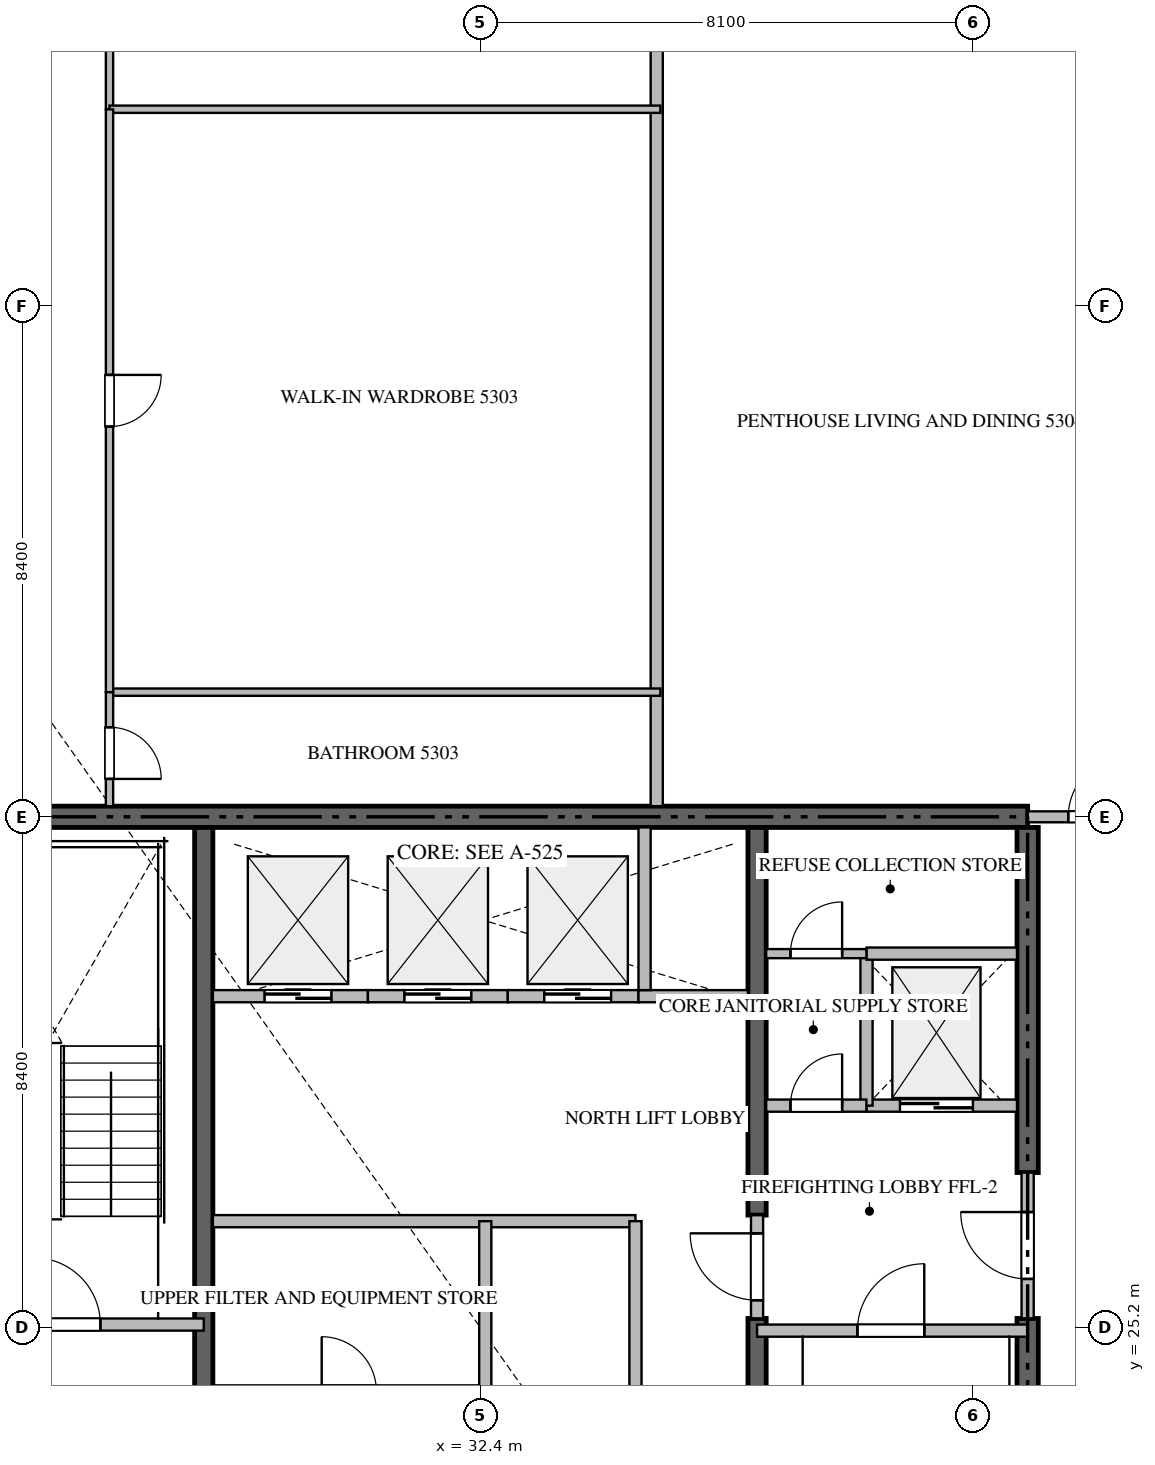
"""IFC4 building model, lengths in metres.
Left out: names, types, materials, properties, quantities, classifications, styles, units other than length and angle.
Written with IfcOpenShell. Run it as: python <this file> out.ifc"""

import sys

from ifc_helpers import new_model, si_unit, direction, frame, frame_2d, origin, place, context, subcontext, project, spatial, rectangle, extrude, source, transform, mapped, element, fill, save


model = new_model("IFC4")
c1 = context("Model", 3, precision=1e-05, world=origin(), true_north=direction((0.0, 1.0)))
c2 = subcontext(c1, "Body", "Model", "MODEL_VIEW")
j1 = project(units=[si_unit("LENGTHUNIT", "METRE"), si_unit("PLANEANGLEUNIT", "RADIAN")], contexts=[c1])
p1 = place(None, origin())
s1 = spatial("IfcSite", under=j1, at=p1, CompositionType="ELEMENT")
p2 = place(p1, origin())
s2 = spatial("IfcBuilding", under=s1, at=p2, CompositionType="ELEMENT")
p3 = place(p2, frame((0.0, 0.0, 214.3)))
s3 = spatial("IfcBuildingStorey", under=s2, at=p3, CompositionType="ELEMENT", Elevation=214.3)
p4 = place(p3, frame((41.4, 33.6, -0.26), z_axis=(0.0, 0.0, 1.0), x_axis=(-1.0, 0.0, 0.0)))
e1 = element("IfcWall", 1, at=p4, inside=s3, PredefinedType="SHEAR", context=c2, shape_type="SweptSolid", body=[
    extrude(rectangle(XDim=18.0, YDim=0.35, at=frame_2d((9.0, 0.0))), origin(), (0.0, 0.0, 1.0), 3.848),
])
p5 = place(p3, frame((41.4, 16.975, -0.26), z_axis=(0.0, 0.0, 1.0), x_axis=(0.0, 1.0, 0.0)))
e2 = element("IfcWall", 2, at=p5, inside=s3, PredefinedType="SHEAR", context=c2, shape_type="SweptSolid", body=[
    extrude(rectangle(XDim=8.375, YDim=0.35, at=frame_2d((4.188, 0.0))), origin(), (0.0, 0.0, 1.0), 3.848),
])
p6 = place(p3, frame((41.4, 27.75, -0.26), z_axis=(0.0, 0.0, 1.0), x_axis=(0.0, 1.0, 0.0)))
e3 = element("IfcWall", 3, at=p6, inside=s3, PredefinedType="SHEAR", context=c2, shape_type="SweptSolid", body=[
    extrude(rectangle(XDim=5.675, YDim=0.35, at=frame_2d((2.837, 0.0))), origin(), (0.0, 0.0, 1.0), 3.848),
])
p7 = place(p3, frame((27.85, 23.55, -0.26), z_axis=(0.0, 0.0, 1.0), x_axis=(0.0, 1.0, 0.0)))
e4 = element("IfcWall", 4, at=p7, inside=s3, PredefinedType="SHEAR", context=c2, shape_type="SweptSolid", body=[
    extrude(rectangle(XDim=9.875, YDim=0.3, at=frame_2d((4.938, 0.0))), origin(), (0.0, 0.0, 1.0), 3.848),
])
p8 = place(p3, frame((36.95, 16.975, -0.26), z_axis=(0.0, 0.0, 1.0), x_axis=(0.0, 1.0, 0.0)))
e5 = element("IfcWall", 5, at=p8, inside=s3, PredefinedType="SHEAR", context=c2, shape_type="SweptSolid", body=[
    extrude(rectangle(XDim=8.375, YDim=0.3, at=frame_2d((4.188, 0.0))), origin(), (0.0, 0.0, 1.0), 3.848),
])
p9 = place(p3, frame((36.95, 27.05, -0.26), z_axis=(0.0, 0.0, 1.0), x_axis=(0.0, 1.0, 0.0)))
e6 = element("IfcWall", 6, at=p9, inside=s3, PredefinedType="SHEAR", context=c2, shape_type="SweptSolid", body=[
    extrude(rectangle(XDim=6.375, YDim=0.3, at=frame_2d((3.188, 0.0))), origin(), (0.0, 0.0, 1.0), 3.848),
])
p10 = place(p3, frame((23.4, 25.25, 0.0), z_axis=(0.0, 0.0, 1.0), x_axis=(1.0, 0.0, 0.0)))
e7 = element("IfcWall", 7, at=p10, inside=s3, PredefinedType="STANDARD", context=c2, shape_type="SweptSolid", body=[
    extrude(rectangle(XDim=4.45, YDim=0.2, at=frame_2d((2.225, 0.0))), origin(), (0.0, 0.0, 1.0), 3.59),
])
p11 = place(p10, frame((1.65, 0.0, 0.0)))
e8 = element("IfcOpeningElement", 8, at=p11, cuts=e7, PredefinedType="OPENING", context=c2, shape_type="SweptSolid", body=[
    extrude(rectangle(XDim=1.1, YDim=2.15, at=frame_2d((0.55, 1.075))), frame((0.0, 0.11, 0.0), z_axis=(0.0, -1.0, 0.0), x_axis=(1.0, 0.0, 0.0)), (0.0, 0.0, 1.0), 0.22),
])
p12 = place(p3, frame((36.95, 25.15, 0.0), z_axis=(0.0, 0.0, 1.0), x_axis=(1.0, 0.0, 0.0)))
e9 = element("IfcWall", 9, at=p12, inside=s3, PredefinedType="STANDARD", context=c2, shape_type="SweptSolid", body=[
    extrude(rectangle(XDim=4.45, YDim=0.2, at=frame_2d((2.225, 0.0))), origin(), (0.0, 0.0, 1.0), 3.59),
])
p13 = place(p12, frame((1.65, 0.0, 0.0)))
e10 = element("IfcOpeningElement", 10, at=p13, cuts=e9, PredefinedType="OPENING", context=c2, shape_type="SweptSolid", body=[
    extrude(rectangle(XDim=1.1, YDim=2.15, at=frame_2d((0.55, 1.075))), frame((0.0, 0.11, 0.0), z_axis=(0.0, -1.0, 0.0), x_axis=(1.0, 0.0, 0.0)), (0.0, 0.0, 1.0), 0.22),
])
p14 = place(p3, frame((38.75, 28.85, 0.0), z_axis=(0.0, 0.0, 1.0), x_axis=(1.0, 0.0, 0.0)))
e11 = element("IfcWall", 11, at=p14, inside=s3, PredefinedType="STANDARD", context=c2, shape_type="SweptSolid", body=[
    extrude(rectangle(XDim=2.475, YDim=0.2, at=frame_2d((1.238, 0.0))), origin(), (0.0, 0.0, 1.0), 3.59),
])
p15 = place(p14, frame((0.55, 0.0, 0.0)))
e12 = element("IfcOpeningElement", 12, at=p15, cuts=e11, PredefinedType="OPENING", context=c2, shape_type="SweptSolid", body=[
    extrude(rectangle(XDim=1.2, YDim=2.2, at=frame_2d((0.6, 1.1))), frame((0.0, 0.11, 0.0), z_axis=(0.0, -1.0, 0.0), x_axis=(1.0, 0.0, 0.0)), (0.0, 0.0, 1.0), 0.22),
])
p16 = place(p3, frame((28.0, 30.65, 0.0), z_axis=(0.0, 0.0, 1.0), x_axis=(1.0, 0.0, 0.0)))
e13 = element("IfcWall", 13, at=p16, inside=s3, PredefinedType="STANDARD", context=c2, shape_type="SweptSolid", body=[
    extrude(rectangle(XDim=2.55, YDim=0.2, at=frame_2d((1.275, 0.0))), origin(), (0.0, 0.0, 1.0), 3.59),
])
p17 = place(p16, frame((0.85, 0.0, 0.0)))
e14 = element("IfcOpeningElement", 14, at=p17, cuts=e13, PredefinedType="OPENING", context=c2, shape_type="SweptSolid", body=[
    extrude(rectangle(XDim=1.1, YDim=2.2, at=frame_2d((0.55, 1.1))), frame((0.0, 0.11, 0.0), z_axis=(0.0, -1.0, 0.0), x_axis=(1.0, 0.0, 0.0)), (0.0, 0.0, 1.0), 0.22),
])
p18 = place(p3, frame((30.55, 30.65, 0.0), z_axis=(0.0, 0.0, 1.0), x_axis=(1.0, 0.0, 0.0)))
e15 = element("IfcWall", 15, at=p18, inside=s3, PredefinedType="STANDARD", context=c2, shape_type="SweptSolid", body=[
    extrude(rectangle(XDim=2.3, YDim=0.2, at=frame_2d((1.15, 0.0))), origin(), (0.0, 0.0, 1.0), 3.59),
])
p19 = place(p18, frame((0.6, 0.0, 0.0)))
e16 = element("IfcOpeningElement", 16, at=p19, cuts=e15, PredefinedType="OPENING", context=c2, shape_type="SweptSolid", body=[
    extrude(rectangle(XDim=1.1, YDim=2.2, at=frame_2d((0.55, 1.1))), frame((0.0, 0.11, 0.0), z_axis=(0.0, -1.0, 0.0), x_axis=(1.0, 0.0, 0.0)), (0.0, 0.0, 1.0), 0.22),
])
p20 = place(p3, frame((32.85, 30.65, 0.0), z_axis=(0.0, 0.0, 1.0), x_axis=(1.0, 0.0, 0.0)))
e17 = element("IfcWall", 17, at=p20, inside=s3, PredefinedType="STANDARD", context=c2, shape_type="SweptSolid", body=[
    extrude(rectangle(XDim=2.15, YDim=0.2, at=frame_2d((1.075, 0.0))), origin(), (0.0, 0.0, 1.0), 3.59),
])
p21 = place(p20, frame((0.6, 0.0, 0.0)))
e18 = element("IfcOpeningElement", 18, at=p21, cuts=e17, PredefinedType="OPENING", context=c2, shape_type="SweptSolid", body=[
    extrude(rectangle(XDim=1.1, YDim=2.2, at=frame_2d((0.55, 1.1))), frame((0.0, 0.11, 0.0), z_axis=(0.0, -1.0, 0.0), x_axis=(1.0, 0.0, 0.0)), (0.0, 0.0, 1.0), 0.22),
])
p22 = place(p3, frame((35.0, 30.65, 0.0), z_axis=(0.0, 0.0, 1.0), x_axis=(1.0, 0.0, 0.0)))
e19 = element("IfcWall", 19, at=p22, inside=s3, PredefinedType="STANDARD", context=c2, shape_type="SweptSolid", body=[
    extrude(rectangle(XDim=1.8, YDim=0.2, at=frame_2d((0.9, 0.0))), origin(), (0.0, 0.0, 1.0), 3.59),
])
p23 = place(p3, frame((35.1, 30.75, 0.0), z_axis=(0.0, 0.0, 1.0), x_axis=(0.0, 1.0, 0.0)))
e20 = element("IfcWall", 20, at=p23, inside=s3, PredefinedType="STANDARD", context=c2, shape_type="SweptSolid", body=[
    extrude(rectangle(XDim=2.675, YDim=0.2, at=frame_2d((1.337, 0.0))), origin(), (0.0, 0.0, 1.0), 3.59),
])
p24 = place(p3, frame((38.75, 28.85, 0.0), z_axis=(0.0, 0.0, 1.0), x_axis=(0.0, 1.0, 0.0)))
e21 = element("IfcWall", 21, at=p24, inside=s3, PredefinedType="STANDARD", context=c2, shape_type="SweptSolid", body=[
    extrude(rectangle(XDim=2.5, YDim=0.2, at=frame_2d((1.25, 0.0))), origin(), (0.0, 0.0, 1.0), 3.59),
])
p25 = place(p3, frame((38.75, 31.35, 0.0), z_axis=(0.0, 0.0, 1.0), x_axis=(1.0, 0.0, 0.0)))
e22 = element("IfcWall", 22, at=p25, inside=s3, PredefinedType="STANDARD", context=c2, shape_type="SweptSolid", body=[
    extrude(rectangle(XDim=2.475, YDim=0.2, at=frame_2d((1.238, 0.0))), origin(), (0.0, 0.0, 1.0), 3.59),
])
p26 = place(p3, frame((37.1, 28.85, 0.0), z_axis=(0.0, 0.0, 1.0), x_axis=(1.0, 0.0, 0.0)))
e23 = element("IfcWall", 23, at=p26, inside=s3, PredefinedType="STANDARD", context=c2, shape_type="SweptSolid", body=[
    extrude(rectangle(XDim=1.648, YDim=0.2, at=frame_2d((0.824, 0.0))), origin(), (0.0, 0.0, 1.0), 3.59),
])
p27 = place(p26, frame((0.399, 0.0, 0.0)))
e24 = element("IfcOpeningElement", 24, at=p27, cuts=e23, PredefinedType="OPENING", context=c2, shape_type="SweptSolid", body=[
    extrude(rectangle(XDim=0.85, YDim=2.1, at=frame_2d((0.425, 1.05))), frame((0.0, 0.11, 0.0), z_axis=(0.0, -1.0, 0.0), x_axis=(1.0, 0.0, 0.0)), (0.0, 0.0, 1.0), 0.22),
])
p28 = place(p3, frame((41.4, 25.352, 0.0), z_axis=(0.0, 0.0, 1.0), x_axis=(0.0, 1.0, 0.0)))
e25 = element("IfcWall", 25, at=p28, inside=s3, PredefinedType="STANDARD", context=c2, shape_type="SweptSolid", body=[
    extrude(rectangle(XDim=2.396, YDim=0.2, at=frame_2d((1.198, 0.0))), origin(), (0.0, 0.0, 1.0), 3.59),
])
p29 = place(p28, frame((0.648, 0.0, 0.0)))
e26 = element("IfcOpeningElement", 26, at=p29, cuts=e25, PredefinedType="OPENING", context=c2, shape_type="SweptSolid", body=[
    extrude(rectangle(XDim=1.1, YDim=2.15, at=frame_2d((0.55, 1.075))), frame((0.0, 0.11, 0.0), z_axis=(0.0, -1.0, 0.0), x_axis=(1.0, 0.0, 0.0)), (0.0, 0.0, 1.0), 0.22),
])
p30 = place(p3, frame((36.95, 25.352, 0.0), z_axis=(0.0, 0.0, 1.0), x_axis=(0.0, 1.0, 0.0)))
e27 = element("IfcWall", 27, at=p30, inside=s3, PredefinedType="STANDARD", context=c2, shape_type="SweptSolid", body=[
    extrude(rectangle(XDim=1.696, YDim=0.2, at=frame_2d((0.848, 0.0))), origin(), (0.0, 0.0, 1.0), 3.59),
])
p31 = place(p30, frame((0.298, 0.0, 0.0)))
e28 = element("IfcOpeningElement", 28, at=p31, cuts=e27, PredefinedType="OPENING", context=c2, shape_type="SweptSolid", body=[
    extrude(rectangle(XDim=1.1, YDim=2.15, at=frame_2d((0.55, 1.075))), frame((0.0, 0.11, 0.0), z_axis=(0.0, -1.0, 0.0), x_axis=(1.0, 0.0, 0.0)), (0.0, 0.0, 1.0), 0.22),
])
p32 = place(p3, frame((37.1, 31.35, 0.0), z_axis=(0.0, 0.0, 1.0), x_axis=(1.0, 0.0, 0.0)))
e29 = element("IfcWall", 29, at=p32, inside=s3, PredefinedType="PARTITIONING", context=c2, shape_type="SweptSolid", body=[
    extrude(rectangle(XDim=1.648, YDim=0.15, at=frame_2d((0.824, 0.0))), origin(), (0.0, 0.0, 1.0), 3.59),
])
p33 = place(p32, frame((0.399, 0.0, 0.0)))
e30 = element("IfcOpeningElement", 30, at=p33, cuts=e29, PredefinedType="OPENING", context=c2, shape_type="SweptSolid", body=[
    extrude(rectangle(XDim=0.85, YDim=2.1, at=frame_2d((0.425, 1.05))), frame((0.0, 0.085, 0.0), z_axis=(0.0, -1.0, 0.0), x_axis=(1.0, 0.0, 0.0)), (0.0, 0.0, 1.0), 0.17),
])
p34 = place(p3, frame((28.0, 26.95, 0.0), z_axis=(0.0, 0.0, 1.0), x_axis=(1.0, 0.0, 0.0)))
e31 = element("IfcWall", 31, at=p34, inside=s3, PredefinedType="STANDARD", context=c2, shape_type="SweptSolid", body=[
    extrude(rectangle(XDim=6.95, YDim=0.2, at=frame_2d((3.475, 0.0))), origin(), (0.0, 0.0, 1.0), 3.59),
])
for number, where, z_axis, x_axis in (
    (32, (34.95, 24.15, 0.0), (0.0, 0.0, 1.0), (0.0, 1.0, 0.0)),
    (33, (32.48, 24.15, 0.0), (0.0, 0.0, 1.0), (0.0, 1.0, 0.0)),
):
    element("IfcWall", number, at=place(p3, frame(where, z_axis=z_axis, x_axis=x_axis)), inside=s3, PredefinedType="STANDARD", context=c2, shape_type="SweptSolid", body=[
        extrude(rectangle(XDim=2.8, YDim=0.2, at=frame_2d((1.4, 0.0))), origin(), (0.0, 0.0, 1.0), 3.59),
    ])
p35 = place(p3, frame((35.3, 33.775, 0.0), z_axis=(0.0, 0.0, 1.0), x_axis=(0.0, 1.0, 0.0)))
e34 = element("IfcWall", 34, at=p35, inside=s3, PredefinedType="PARTITIONING", context=c2, shape_type="SweptSolid", body=[
    extrude(rectangle(XDim=15.343, YDim=0.2, at=frame_2d((7.671, 0.0))), origin(), (0.0, 0.0, 1.0), 3.59),
])
p36 = place(p3, frame((41.402, 33.6, 0.0), z_axis=(0.0, 0.0, 1.0), x_axis=(1.0, 0.0, 0.0)))
e35 = element("IfcWall", 35, at=p36, inside=s3, PredefinedType="PARTITIONING", context=c2, shape_type="SweptSolid", body=[
    extrude(rectangle(XDim=2.496, YDim=0.18, at=frame_2d((1.248, 0.0))), origin(), (0.0, 0.0, 1.0), 3.59),
])
p37 = place(p36, frame((0.666, 0.0, 0.0)))
e36 = element("IfcOpeningElement", 36, at=p37, cuts=e35, PredefinedType="OPENING", context=c2, shape_type="SweptSolid", body=[
    extrude(rectangle(XDim=1.0, YDim=2.15, at=frame_2d((0.5, 1.075))), frame((0.0, 0.1, 0.0), z_axis=(0.0, -1.0, 0.0), x_axis=(1.0, 0.0, 0.0)), (0.0, 0.0, 1.0), 0.2),
])
p38 = place(p3, frame((26.3, 49.105, 0.0), z_axis=(0.0, 0.0, 1.0), x_axis=(0.0, -1.0, 0.0)))
e37 = element("IfcWall", 37, at=p38, inside=s3, PredefinedType="PARTITIONING", context=c2, shape_type="SweptSolid", body=[
    extrude(rectangle(XDim=3.869, YDim=0.12, at=frame_2d((1.935, 0.0))), origin(), (0.0, 0.0, 1.0), 3.59),
])
p39 = place(p38, frame((1.633, 0.0, 0.0)))
e38 = element("IfcOpeningElement", 38, at=p39, cuts=e37, PredefinedType="OPENING", context=c2, shape_type="SweptSolid", body=[
    extrude(rectangle(XDim=0.9, YDim=2.1, at=frame_2d((0.45, 1.05))), frame((0.0, 0.07, 0.0), z_axis=(0.0, -1.0, 0.0), x_axis=(1.0, 0.0, 0.0)), (0.0, 0.0, 1.0), 0.14),
])
for number, where, z_axis, x_axis in (
    (39, (26.3, 45.236, 0.0), (0.0, 0.0, 1.0), (1.0, 0.0, 0.0)),
    (40, (26.3, 35.65, 0.0), (0.0, 0.0, 1.0), (1.0, 0.0, 0.0)),
):
    element("IfcWall", number, at=place(p3, frame(where, z_axis=z_axis, x_axis=x_axis)), inside=s3, PredefinedType="PARTITIONING", context=c2, shape_type="SweptSolid", body=[
        extrude(rectangle(XDim=9.06, YDim=0.12, at=frame_2d((4.53, 0.0))), origin(), (0.0, 0.0, 1.0), 3.59),
    ])
p40 = place(p3, frame((26.3, 45.234, 0.0), z_axis=(0.0, 0.0, 1.0), x_axis=(0.0, -1.0, 0.0)))
e41 = element("IfcWall", 41, at=p40, inside=s3, PredefinedType="PARTITIONING", context=c2, shape_type="SweptSolid", body=[
    extrude(rectangle(XDim=9.584, YDim=0.12, at=frame_2d((4.792, 0.0))), origin(), (0.0, 0.0, 1.0), 3.59),
])
p41 = place(p40, frame((4.367, 0.0, 0.0)))
e42 = element("IfcOpeningElement", 42, at=p41, cuts=e41, PredefinedType="OPENING", context=c2, shape_type="SweptSolid", body=[
    extrude(rectangle(XDim=0.85, YDim=2.1, at=frame_2d((0.425, 1.05))), frame((0.0, 0.07, 0.0), z_axis=(0.0, -1.0, 0.0), x_axis=(1.0, 0.0, 0.0)), (0.0, 0.0, 1.0), 0.14),
])
p42 = place(p3, frame((26.3, 35.648, 0.0), z_axis=(0.0, 0.0, 1.0), x_axis=(0.0, -1.0, 0.0)))
e43 = element("IfcWall", 43, at=p42, inside=s3, PredefinedType="PARTITIONING", context=c2, shape_type="SweptSolid", body=[
    extrude(rectangle(XDim=1.873, YDim=0.12, at=frame_2d((0.937, 0.0))), origin(), (0.0, 0.0, 1.0), 3.59),
])
p43 = place(p42, frame((0.575, 0.0, 0.0)))
e44 = element("IfcOpeningElement", 44, at=p43, cuts=e43, PredefinedType="OPENING", context=c2, shape_type="SweptSolid", body=[
    extrude(rectangle(XDim=0.85, YDim=2.1, at=frame_2d((0.425, 1.05))), frame((0.0, 0.07, 0.0), z_axis=(0.0, -1.0, 0.0), x_axis=(1.0, 0.0, 0.0)), (0.0, 0.0, 1.0), 0.14),
])
m1 = source(origin(), c2, "Body", "SweptSolid", [
    extrude(rectangle(XDim=1.1, YDim=2.15, at=frame_2d((0.55, 1.075))), frame((0.0, 0.025, 0.0), z_axis=(0.0, -1.0, 0.0), x_axis=(1.0, 0.0, 0.0)), (0.0, 0.0, 1.0), 0.05),
])
p44 = place(p11, origin())
e45 = element("IfcDoor", 45, at=p44, inside=s3, OperationType="SINGLE_SWING_LEFT", PredefinedType="DOOR", context=c2, shape_type="MappedRepresentation", body=[
    mapped(m1, transform((0.0, 0.0, 0.0), scale=1.0)),
])
fill(e8, e45)
p45 = place(p13, origin())
e46 = element("IfcDoor", 46, at=p45, inside=s3, OperationType="SINGLE_SWING_RIGHT", PredefinedType="DOOR", context=c2, shape_type="MappedRepresentation", body=[
    mapped(m1, transform((0.0, 0.0, 0.0), scale=1.0)),
])
fill(e10, e46)
m2 = source(origin(), c2, "Body", "SweptSolid", [
    extrude(rectangle(XDim=1.2, YDim=2.2, at=frame_2d((0.6, 1.1))), frame((0.0, 0.025, 0.0), z_axis=(0.0, -1.0, 0.0), x_axis=(1.0, 0.0, 0.0)), (0.0, 0.0, 1.0), 0.05),
])
p46 = place(p15, origin())
e47 = element("IfcDoor", 47, at=p46, inside=s3, OperationType="DOUBLE_DOOR_SLIDING", PredefinedType="DOOR", context=c2, shape_type="MappedRepresentation", body=[
    mapped(m2, transform((0.0, 0.0, 0.0), scale=1.0)),
])
fill(e12, e47)
m3 = source(origin(), c2, "Body", "SweptSolid", [
    extrude(rectangle(XDim=1.1, YDim=2.2, at=frame_2d((0.55, 1.1))), frame((0.0, 0.025, 0.0), z_axis=(0.0, -1.0, 0.0), x_axis=(1.0, 0.0, 0.0)), (0.0, 0.0, 1.0), 0.05),
])
p47 = place(p17, origin())
e48 = element("IfcDoor", 48, at=p47, inside=s3, OperationType="DOUBLE_DOOR_SLIDING", PredefinedType="DOOR", context=c2, shape_type="MappedRepresentation", body=[
    mapped(m3, transform((0.0, 0.0, 0.0), scale=1.0)),
])
fill(e14, e48)
p48 = place(p19, origin())
e49 = element("IfcDoor", 49, at=p48, inside=s3, OperationType="DOUBLE_DOOR_SLIDING", PredefinedType="DOOR", context=c2, shape_type="MappedRepresentation", body=[
    mapped(m3, transform((0.0, 0.0, 0.0), scale=1.0)),
])
fill(e16, e49)
p49 = place(p21, origin())
e50 = element("IfcDoor", 50, at=p49, inside=s3, OperationType="DOUBLE_DOOR_SLIDING", PredefinedType="DOOR", context=c2, shape_type="MappedRepresentation", body=[
    mapped(m3, transform((0.0, 0.0, 0.0), scale=1.0)),
])
fill(e18, e50)
m4 = source(origin(), c2, "Body", "SweptSolid", [
    extrude(rectangle(XDim=0.85, YDim=2.1, at=frame_2d((0.425, 1.05))), frame((0.0, 0.025, 0.0), z_axis=(0.0, -1.0, 0.0), x_axis=(1.0, 0.0, 0.0)), (0.0, 0.0, 1.0), 0.05),
])
p50 = place(p27, origin())
e51 = element("IfcDoor", 51, at=p50, inside=s3, OperationType="SINGLE_SWING_RIGHT", PredefinedType="DOOR", context=c2, shape_type="MappedRepresentation", body=[
    mapped(m4, transform((0.0, 0.0, 0.0), scale=1.0)),
])
fill(e24, e51)
p51 = place(p29, origin())
e52 = element("IfcDoor", 52, at=p51, inside=s3, OperationType="SINGLE_SWING_RIGHT", PredefinedType="DOOR", context=c2, shape_type="MappedRepresentation", body=[
    mapped(m1, transform((0.0, 0.0, 0.0), scale=1.0)),
])
fill(e26, e52)
p52 = place(p31, origin())
e53 = element("IfcDoor", 53, at=p52, inside=s3, OperationType="SINGLE_SWING_RIGHT", PredefinedType="DOOR", context=c2, shape_type="MappedRepresentation", body=[
    mapped(m1, transform((0.0, 0.0, 0.0), scale=1.0)),
])
fill(e28, e53)
p53 = place(p33, origin())
e54 = element("IfcDoor", 54, at=p53, inside=s3, OperationType="SINGLE_SWING_RIGHT", PredefinedType="DOOR", context=c2, shape_type="MappedRepresentation", body=[
    mapped(m4, transform((0.0, 0.0, 0.0), scale=1.0)),
])
fill(e30, e54)
m5 = source(origin(), c2, "Body", "SweptSolid", [
    extrude(rectangle(XDim=1.0, YDim=2.15, at=frame_2d((0.5, 1.075))), frame((0.0, 0.025, 0.0), z_axis=(0.0, -1.0, 0.0), x_axis=(1.0, 0.0, 0.0)), (0.0, 0.0, 1.0), 0.05),
])
p54 = place(p37, origin())
e55 = element("IfcDoor", 55, at=p54, inside=s3, OperationType="SINGLE_SWING_RIGHT", PredefinedType="DOOR", context=c2, shape_type="MappedRepresentation", body=[
    mapped(m5, transform((0.0, 0.0, 0.0), scale=1.0)),
])
fill(e36, e55)
p55 = place(p41, origin())
e56 = element("IfcDoor", 56, at=p55, inside=s3, OperationType="SINGLE_SWING_LEFT", PredefinedType="DOOR", context=c2, shape_type="MappedRepresentation", body=[
    mapped(m4, transform((0.0, 0.0, 0.0), scale=1.0)),
])
fill(e42, e56)
p56 = place(p43, origin())
e57 = element("IfcDoor", 57, at=p56, inside=s3, OperationType="SINGLE_SWING_RIGHT", PredefinedType="DOOR", context=c2, shape_type="MappedRepresentation", body=[
    mapped(m4, transform((0.0, 0.0, 0.0), scale=1.0)),
])
fill(e44, e57)
save(model, sys.argv[1])
